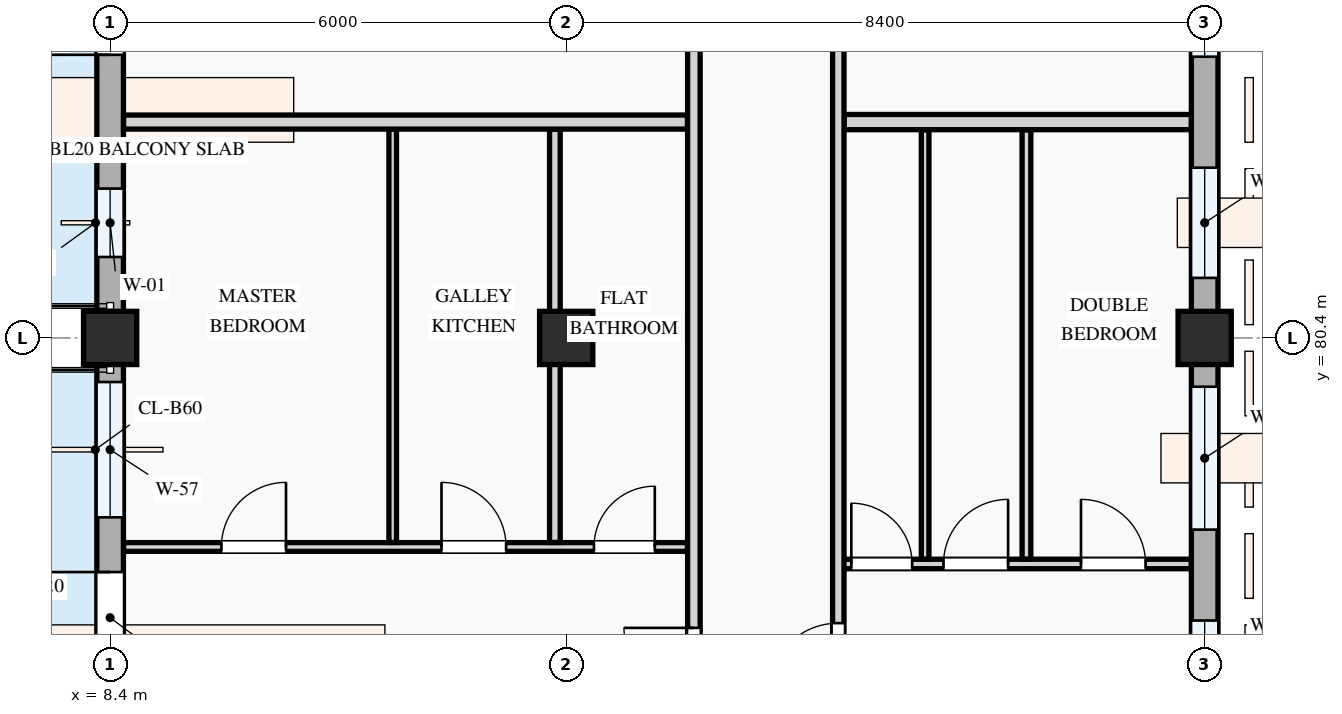
"""IFC4 building model, lengths in metres.
Left out: names, types, materials, properties, quantities, classifications, styles, units other than length and angle.
Written with IfcOpenShell. Run it as: python <this file> out.ifc"""

import sys

from ifc_helpers import new_model, si_unit, direction, frame, frame_2d, origin, origin_2d, place, context, subcontext, project, spatial, rectangle, extrude, element, fill, save


model = new_model("IFC4")
c1 = context("Model", 3, precision=1e-05, world=origin(), true_north=direction((0.0, 1.0)))
c2 = subcontext(c1, "Body", "Model", "MODEL_VIEW")
j1 = project(units=[si_unit("LENGTHUNIT", "METRE"), si_unit("PLANEANGLEUNIT", "RADIAN")], contexts=[c1])
p1 = place(None, origin())
s1 = spatial("IfcSite", under=j1, at=p1, CompositionType="ELEMENT")
p2 = place(p1, origin())
s2 = spatial("IfcBuilding", under=s1, at=p2, CompositionType="ELEMENT")
p3 = place(p2, frame((0.0, 0.0, 14.7)))
s3 = spatial("IfcBuildingStorey", under=s2, at=p3, CompositionType="ELEMENT", Elevation=14.7)
for number, where, z_axis, x_axis in (
    (1, (8.4, 80.4, 0.0), (0.0, 0.0, 1.0), (1.0, 0.0, 0.0)),
    (2, (14.4, 80.4, 0.0), (0.0, 0.0, 1.0), (1.0, 0.0, 0.0)),
    (3, (22.8, 80.4, 0.0), (0.0, 0.0, 1.0), (1.0, 0.0, 0.0)),
):
    element("IfcColumn", number, at=place(p3, frame(where, z_axis=z_axis, x_axis=x_axis)), inside=s3, PredefinedType="COLUMN", context=c2, shape_type="SweptSolid", body=[
        extrude(rectangle(XDim=0.7, YDim=0.7, at=origin_2d()), origin(), (0.0, 0.0, 1.0), 3.3),
    ])
p4 = place(p3, frame((8.4, 86.4, 0.0), z_axis=(0.0, 0.0, 1.0), x_axis=(0.0, -1.0, 0.0)))
e4 = element("IfcWall", 4, at=p4, inside=s3, PredefinedType="STANDARD", context=c2, shape_type="SweptSolid", body=[
    extrude(rectangle(XDim=6.0, YDim=0.35, at=frame_2d((3.0, 0.0))), origin(), (0.0, 0.0, 1.0), 2.445),
])
p5 = place(p4, frame((1.175, 0.0, 0.0)))
e5 = element("IfcOpeningElement", 5, at=p5, cuts=e4, PredefinedType="OPENING", context=c2, shape_type="SweptSolid", body=[
    extrude(rectangle(XDim=1.1, YDim=2.15, at=frame_2d((0.55, 1.075))), frame((0.0, 0.185, 0.0), z_axis=(0.0, -1.0, 0.0), x_axis=(1.0, 0.0, 0.0)), (0.0, 0.0, 1.0), 0.37),
])
p6 = place(p4, frame((4.035, 0.0, 0.78)))
e6 = element("IfcOpeningElement", 6, at=p6, cuts=e4, PredefinedType="OPENING", context=c2, shape_type="SweptSolid", body=[
    extrude(rectangle(XDim=0.9, YDim=1.2, at=frame_2d((0.45, 0.6))), frame((0.0, 0.185, 0.0), z_axis=(0.0, -1.0, 0.0), x_axis=(1.0, 0.0, 0.0)), (0.0, 0.0, 1.0), 0.37),
])
p7 = place(p3, frame((8.4, 80.4, 0.0), z_axis=(0.0, 0.0, 1.0), x_axis=(0.0, -1.0, 0.0)))
e7 = element("IfcWall", 7, at=p7, inside=s3, PredefinedType="STANDARD", context=c2, shape_type="SweptSolid", body=[
    extrude(rectangle(XDim=8.4, YDim=0.35, at=frame_2d((4.2, 0.0))), origin(), (0.0, 0.0, 1.0), 2.345),
])
p8 = place(p7, frame((3.08, 0.0, 0.0)))
e8 = element("IfcOpeningElement", 8, at=p8, cuts=e7, PredefinedType="OPENING", context=c2, shape_type="SweptSolid", body=[
    extrude(rectangle(XDim=1.2, YDim=2.15, at=frame_2d((0.6, 1.075))), frame((0.0, 0.185, 0.0), z_axis=(0.0, -1.0, 0.0), x_axis=(1.0, 0.0, 0.0)), (0.0, 0.0, 1.0), 0.37),
])
p9 = place(p7, frame((0.58, 0.0, 0.78)))
e9 = element("IfcOpeningElement", 9, at=p9, cuts=e7, PredefinedType="OPENING", context=c2, shape_type="SweptSolid", body=[
    extrude(rectangle(XDim=1.78, YDim=1.42, at=frame_2d((0.89, 0.71))), frame((0.0, 0.185, 0.0), z_axis=(0.0, -1.0, 0.0), x_axis=(1.0, 0.0, 0.0)), (0.0, 0.0, 1.0), 0.37),
])
p10 = place(p7, frame((5.51, 0.0, 0.78)))
e10 = element("IfcOpeningElement", 10, at=p10, cuts=e7, PredefinedType="OPENING", context=c2, shape_type="SweptSolid", body=[
    extrude(rectangle(XDim=1.52, YDim=1.42, at=frame_2d((0.76, 0.71))), frame((0.0, 0.185, 0.0), z_axis=(0.0, -1.0, 0.0), x_axis=(1.0, 0.0, 0.0)), (0.0, 0.0, 1.0), 0.37),
])
p11 = place(p3, frame((22.8, 72.0, 0.0), z_axis=(0.0, 0.0, 1.0), x_axis=(0.0, 1.0, 0.0)))
e11 = element("IfcWall", 11, at=p11, inside=s3, PredefinedType="STANDARD", context=c2, shape_type="SweptSolid", body=[
    extrude(rectangle(XDim=8.4, YDim=0.35, at=frame_2d((4.2, 0.0))), origin(), (0.0, 0.0, 1.0), 2.425),
])
p12 = place(p11, frame((0.544, 0.0, 0.78)))
e12 = element("IfcOpeningElement", 12, at=p12, cuts=e11, PredefinedType="OPENING", context=c2, shape_type="SweptSolid", body=[
    extrude(rectangle(XDim=1.98, YDim=1.5, at=frame_2d((0.99, 0.75))), frame((0.0, 0.185, 0.0), z_axis=(0.0, -1.0, 0.0), x_axis=(1.0, 0.0, 0.0)), (0.0, 0.0, 1.0), 0.37),
])
p13 = place(p11, frame((3.482, 0.0, 0.78)))
e13 = element("IfcOpeningElement", 13, at=p13, cuts=e11, PredefinedType="OPENING", context=c2, shape_type="SweptSolid", body=[
    extrude(rectangle(XDim=1.2, YDim=1.35, at=frame_2d((0.6, 0.675))), frame((0.0, 0.185, 0.0), z_axis=(0.0, -1.0, 0.0), x_axis=(1.0, 0.0, 0.0)), (0.0, 0.0, 1.0), 0.37),
])
p14 = place(p11, frame((5.878, 0.0, 0.78)))
e14 = element("IfcOpeningElement", 14, at=p14, cuts=e11, PredefinedType="OPENING", context=c2, shape_type="SweptSolid", body=[
    extrude(rectangle(XDim=1.88, YDim=1.52, at=frame_2d((0.94, 0.76))), frame((0.0, 0.185, 0.0), z_axis=(0.0, -1.0, 0.0), x_axis=(1.0, 0.0, 0.0)), (0.0, 0.0, 1.0), 0.37),
])
p15 = place(p3, frame((22.8, 80.4, 0.0), z_axis=(0.0, 0.0, 1.0), x_axis=(0.0, 1.0, 0.0)))
e15 = element("IfcWall", 15, at=p15, inside=s3, PredefinedType="STANDARD", context=c2, shape_type="SweptSolid", body=[
    extrude(rectangle(XDim=6.0, YDim=0.35, at=frame_2d((3.0, 0.0))), origin(), (0.0, 0.0, 1.0), 2.575),
])
p16 = place(p15, frame((0.79, 0.0, 0.78)))
e16 = element("IfcOpeningElement", 16, at=p16, cuts=e15, PredefinedType="OPENING", context=c2, shape_type="SweptSolid", body=[
    extrude(rectangle(XDim=1.45, YDim=1.6, at=frame_2d((0.725, 0.8))), frame((0.0, 0.185, 0.0), z_axis=(0.0, -1.0, 0.0), x_axis=(1.0, 0.0, 0.0)), (0.0, 0.0, 1.0), 0.37),
])
p17 = place(p15, frame((3.7, 0.0, 0.78)))
e17 = element("IfcOpeningElement", 17, at=p17, cuts=e15, PredefinedType="OPENING", context=c2, shape_type="SweptSolid", body=[
    extrude(rectangle(XDim=1.25, YDim=1.45, at=frame_2d((0.625, 0.725))), frame((0.0, 0.185, 0.0), z_axis=(0.0, -1.0, 0.0), x_axis=(1.0, 0.0, 0.0)), (0.0, 0.0, 1.0), 0.37),
])
p18 = place(p3, frame((8.577, 77.65, 0.0), z_axis=(0.0, 0.0, 1.0), x_axis=(1.0, 0.0, 0.0)))
e18 = element("IfcWall", 18, at=p18, inside=s3, PredefinedType="PARTITIONING", context=c2, shape_type="SweptSolid", body=[
    extrude(rectangle(XDim=7.419, YDim=0.115, at=frame_2d((3.709, 0.0))), origin(), (0.0, 0.0, 1.0), 3.0),
])
p19 = place(p18, frame((1.287, 0.0, 0.0)))
e19 = element("IfcOpeningElement", 19, at=p19, cuts=e18, PredefinedType="OPENING", context=c2, shape_type="SweptSolid", body=[
    extrude(rectangle(XDim=0.85, YDim=2.1, at=frame_2d((0.425, 1.05))), frame((0.0, 0.067, 0.0), z_axis=(0.0, -1.0, 0.0), x_axis=(1.0, 0.0, 0.0)), (0.0, 0.0, 1.0), 0.135),
])
p20 = place(p18, frame((4.182, 0.0, 0.0)))
e20 = element("IfcOpeningElement", 20, at=p20, cuts=e18, PredefinedType="OPENING", context=c2, shape_type="SweptSolid", body=[
    extrude(rectangle(XDim=0.85, YDim=2.1, at=frame_2d((0.425, 1.05))), frame((0.0, 0.067, 0.0), z_axis=(0.0, -1.0, 0.0), x_axis=(1.0, 0.0, 0.0)), (0.0, 0.0, 1.0), 0.135),
])
p21 = place(p18, frame((6.189, 0.0, 0.0)))
e21 = element("IfcOpeningElement", 21, at=p21, cuts=e18, PredefinedType="OPENING", context=c2, shape_type="SweptSolid", body=[
    extrude(rectangle(XDim=0.8, YDim=2.1, at=frame_2d((0.4, 1.05))), frame((0.0, 0.067, 0.0), z_axis=(0.0, -1.0, 0.0), x_axis=(1.0, 0.0, 0.0)), (0.0, 0.0, 1.0), 0.135),
])
p22 = place(p3, frame((12.118, 77.709, 0.0), z_axis=(0.0, 0.0, 1.0), x_axis=(0.0, 1.0, 0.0)))
e22 = element("IfcWall", 22, at=p22, inside=s3, PredefinedType="PARTITIONING", context=c2, shape_type="SweptSolid", body=[
    extrude(rectangle(XDim=5.436, YDim=0.1, at=frame_2d((2.718, 0.0))), origin(), (0.0, 0.0, 1.0), 3.0),
])
p23 = place(p3, frame((14.251, 77.709, 0.0), z_axis=(0.0, 0.0, 1.0), x_axis=(0.0, 1.0, 0.0)))
e23 = element("IfcWall", 23, at=p23, inside=s3, PredefinedType="PARTITIONING", context=c2, shape_type="SweptSolid", body=[
    extrude(rectangle(XDim=5.436, YDim=0.14, at=frame_2d((2.718, 0.0))), origin(), (0.0, 0.0, 1.0), 2.425),
])
p24 = place(p3, frame((17.98, 77.427, 0.0), z_axis=(0.0, 0.0, 1.0), x_axis=(1.0, 0.0, 0.0)))
e24 = element("IfcWall", 24, at=p24, inside=s3, PredefinedType="PARTITIONING", context=c2, shape_type="SweptSolid", body=[
    extrude(rectangle(XDim=4.643, YDim=0.125, at=frame_2d((2.322, 0.0))), origin(), (0.0, 0.0, 1.0), 3.0),
])
p25 = place(p24, frame((0.171, 0.0, 0.0)))
e25 = element("IfcOpeningElement", 25, at=p25, cuts=e24, PredefinedType="OPENING", context=c2, shape_type="SweptSolid", body=[
    extrude(rectangle(XDim=0.8, YDim=2.1, at=frame_2d((0.4, 1.05))), frame((0.0, 0.073, 0.0), z_axis=(0.0, -1.0, 0.0), x_axis=(1.0, 0.0, 0.0)), (0.0, 0.0, 1.0), 0.145),
])
p26 = place(p24, frame((1.384, 0.0, 0.0)))
e26 = element("IfcOpeningElement", 26, at=p26, cuts=e24, PredefinedType="OPENING", context=c2, shape_type="SweptSolid", body=[
    extrude(rectangle(XDim=0.85, YDim=2.1, at=frame_2d((0.425, 1.05))), frame((0.0, 0.073, 0.0), z_axis=(0.0, -1.0, 0.0), x_axis=(1.0, 0.0, 0.0)), (0.0, 0.0, 1.0), 0.145),
])
p27 = place(p24, frame((3.193, 0.0, 0.0)))
e27 = element("IfcOpeningElement", 27, at=p27, cuts=e24, PredefinedType="OPENING", context=c2, shape_type="SweptSolid", body=[
    extrude(rectangle(XDim=0.85, YDim=2.1, at=frame_2d((0.425, 1.05))), frame((0.0, 0.073, 0.0), z_axis=(0.0, -1.0, 0.0), x_axis=(1.0, 0.0, 0.0)), (0.0, 0.0, 1.0), 0.145),
])
p28 = place(p3, frame((20.455, 77.491, 0.0), z_axis=(0.0, 0.0, 1.0), x_axis=(0.0, 1.0, 0.0)))
e28 = element("IfcWall", 28, at=p28, inside=s3, PredefinedType="PARTITIONING", context=c2, shape_type="SweptSolid", body=[
    extrude(rectangle(XDim=5.647, YDim=0.115, at=frame_2d((2.823, 0.0))), origin(), (0.0, 0.0, 1.0), 3.0),
])
p29 = place(p3, frame((19.122, 77.491, 0.0), z_axis=(0.0, 0.0, 1.0), x_axis=(0.0, 1.0, 0.0)))
e29 = element("IfcWall", 29, at=p29, inside=s3, PredefinedType="PARTITIONING", context=c2, shape_type="SweptSolid", body=[
    extrude(rectangle(XDim=5.647, YDim=0.1, at=frame_2d((2.823, 0.0))), origin(), (0.0, 0.0, 1.0), 3.0),
])
p30 = place(p3, frame((8.577, 83.24, 0.0), z_axis=(0.0, 0.0, 1.0), x_axis=(1.0, 0.0, 0.0)))
e30 = element("IfcWall", 30, at=p30, inside=s3, PredefinedType="PARTITIONING", context=c2, shape_type="SweptSolid", body=[
    extrude(rectangle(XDim=7.419, YDim=0.185, at=frame_2d((3.709, 0.0))), origin(), (0.0, 0.0, 1.0), 3.0),
])
p31 = place(p3, frame((18.057, 83.24, 0.0), z_axis=(0.0, 0.0, 1.0), x_axis=(1.0, 0.0, 0.0)))
e31 = element("IfcWall", 31, at=p31, inside=s3, PredefinedType="PARTITIONING", context=c2, shape_type="SweptSolid", body=[
    extrude(rectangle(XDim=4.566, YDim=0.2, at=frame_2d((2.283, 0.0))), origin(), (0.0, 0.0, 1.0), 3.0),
])
p32 = place(p3, frame((16.08, 72.177, 0.0), z_axis=(0.0, 0.0, 1.0), x_axis=(0.0, 1.0, 0.0)))
e32 = element("IfcWall", 32, at=p32, inside=s3, PredefinedType="PARTITIONING", context=c2, shape_type="SweptSolid", body=[
    extrude(rectangle(XDim=37.163, YDim=0.165, at=frame_2d((18.582, 0.0))), origin(), (0.0, 0.0, 1.0), 3.0),
])
p33 = place(p32, frame((3.489, 0.0, 0.0)))
e33 = element("IfcOpeningElement", 33, at=p33, cuts=e32, PredefinedType="OPENING", context=c2, shape_type="SweptSolid", body=[
    extrude(rectangle(XDim=0.92, YDim=2.1, at=frame_2d((0.46, 1.05))), frame((0.0, 0.093, 0.0), z_axis=(0.0, -1.0, 0.0), x_axis=(1.0, 0.0, 0.0)), (0.0, 0.0, 1.0), 0.185),
])
p34 = place(p32, frame((16.543, 0.0, 0.0)))
e34 = element("IfcOpeningElement", 34, at=p34, cuts=e32, PredefinedType="OPENING", context=c2, shape_type="SweptSolid", body=[
    extrude(rectangle(XDim=0.92, YDim=2.1, at=frame_2d((0.46, 1.05))), frame((0.0, 0.093, 0.0), z_axis=(0.0, -1.0, 0.0), x_axis=(1.0, 0.0, 0.0)), (0.0, 0.0, 1.0), 0.185),
])
p35 = place(p32, frame((25.152, 0.0, 0.0)))
e35 = element("IfcOpeningElement", 35, at=p35, cuts=e32, PredefinedType="OPENING", context=c2, shape_type="SweptSolid", body=[
    extrude(rectangle(XDim=0.92, YDim=2.1, at=frame_2d((0.46, 1.05))), frame((0.0, 0.093, 0.0), z_axis=(0.0, -1.0, 0.0), x_axis=(1.0, 0.0, 0.0)), (0.0, 0.0, 1.0), 0.185),
])
p36 = place(p3, frame((17.98, 72.177, 0.0), z_axis=(0.0, 0.0, 1.0), x_axis=(0.0, 1.0, 0.0)))
e36 = element("IfcWall", 36, at=p36, inside=s3, PredefinedType="PARTITIONING", context=c2, shape_type="SweptSolid", body=[
    extrude(rectangle(XDim=37.163, YDim=0.15, at=frame_2d((18.582, 0.0))), origin(), (0.0, 0.0, 1.0), 3.0),
])
p37 = place(p36, frame((3.551, 0.0, 0.0)))
e37 = element("IfcOpeningElement", 37, at=p37, cuts=e36, PredefinedType="OPENING", context=c2, shape_type="SweptSolid", body=[
    extrude(rectangle(XDim=0.92, YDim=2.1, at=frame_2d((0.46, 1.05))), frame((0.0, 0.085, 0.0), z_axis=(0.0, -1.0, 0.0), x_axis=(1.0, 0.0, 0.0)), (0.0, 0.0, 1.0), 0.17),
])
p38 = place(p36, frame((16.275, 0.0, 0.0)))
e38 = element("IfcOpeningElement", 38, at=p38, cuts=e36, PredefinedType="OPENING", context=c2, shape_type="SweptSolid", body=[
    extrude(rectangle(XDim=0.96, YDim=2.12, at=frame_2d((0.48, 1.06))), frame((0.0, 0.085, 0.0), z_axis=(0.0, -1.0, 0.0), x_axis=(1.0, 0.0, 0.0)), (0.0, 0.0, 1.0), 0.17),
])
p39 = place(p36, frame((25.128, 0.0, 0.0)))
e39 = element("IfcOpeningElement", 39, at=p39, cuts=e36, PredefinedType="OPENING", context=c2, shape_type="SweptSolid", body=[
    extrude(rectangle(XDim=0.92, YDim=2.1, at=frame_2d((0.46, 1.05))), frame((0.0, 0.085, 0.0), z_axis=(0.0, -1.0, 0.0), x_axis=(1.0, 0.0, 0.0)), (0.0, 0.0, 1.0), 0.17),
])
p40 = place(p5, frame((1.1, 0.0, 0.0), z_axis=(0.0, 0.0, 1.0), x_axis=(-1.0, 0.0, 0.0)))
e40 = element("IfcDoor", 40, at=p40, inside=s3, OperationType="SINGLE_SWING_LEFT", PredefinedType="DOOR", context=c2, shape_type="SweptSolid", body=[
    extrude(rectangle(XDim=1.1, YDim=2.15, at=frame_2d((0.55, 1.075))), frame((0.0, 0.025, 0.0), z_axis=(0.0, -1.0, 0.0), x_axis=(1.0, 0.0, 0.0)), (0.0, 0.0, 1.0), 0.05),
])
fill(e5, e40)
p41 = place(p6, origin())
e41 = element("IfcWindow", 41, at=p41, inside=s3, PartitioningType="SINGLE_PANEL", PredefinedType="WINDOW", context=c2, shape_type="SweptSolid", body=[
    extrude(rectangle(XDim=0.9, YDim=1.2, at=frame_2d((0.45, 0.6))), frame((0.0, 0.03, 0.0), z_axis=(0.0, -1.0, 0.0), x_axis=(1.0, 0.0, 0.0)), (0.0, 0.0, 1.0), 0.06),
])
fill(e6, e41)
p42 = place(p8, frame((1.2, 0.0, 0.0), z_axis=(0.0, 0.0, 1.0), x_axis=(-1.0, 0.0, 0.0)))
e42 = element("IfcDoor", 42, at=p42, inside=s3, OperationType="SINGLE_SWING_RIGHT", PredefinedType="DOOR", context=c2, shape_type="SweptSolid", body=[
    extrude(rectangle(XDim=1.2, YDim=2.15, at=frame_2d((0.6, 1.075))), frame((0.0, 0.025, 0.0), z_axis=(0.0, -1.0, 0.0), x_axis=(1.0, 0.0, 0.0)), (0.0, 0.0, 1.0), 0.05),
])
fill(e8, e42)
p43 = place(p9, origin())
e43 = element("IfcWindow", 43, at=p43, inside=s3, PartitioningType="DOUBLE_PANEL_VERTICAL", PredefinedType="WINDOW", context=c2, shape_type="SweptSolid", body=[
    extrude(rectangle(XDim=1.78, YDim=1.42, at=frame_2d((0.89, 0.71))), frame((0.0, 0.03, 0.0), z_axis=(0.0, -1.0, 0.0), x_axis=(1.0, 0.0, 0.0)), (0.0, 0.0, 1.0), 0.06),
])
fill(e9, e43)
p44 = place(p13, origin())
e44 = element("IfcWindow", 44, at=p44, inside=s3, PartitioningType="SINGLE_PANEL", PredefinedType="WINDOW", context=c2, shape_type="SweptSolid", body=[
    extrude(rectangle(XDim=1.2, YDim=1.35, at=frame_2d((0.6, 0.675))), frame((0.0, 0.03, 0.0), z_axis=(0.0, -1.0, 0.0), x_axis=(1.0, 0.0, 0.0)), (0.0, 0.0, 1.0), 0.06),
])
fill(e13, e44)
p45 = place(p14, origin())
e45 = element("IfcWindow", 45, at=p45, inside=s3, PartitioningType="DOUBLE_PANEL_VERTICAL", PredefinedType="WINDOW", context=c2, shape_type="SweptSolid", body=[
    extrude(rectangle(XDim=1.88, YDim=1.52, at=frame_2d((0.94, 0.76))), frame((0.0, 0.03, 0.0), z_axis=(0.0, -1.0, 0.0), x_axis=(1.0, 0.0, 0.0)), (0.0, 0.0, 1.0), 0.06),
])
fill(e14, e45)
p46 = place(p16, origin())
e46 = element("IfcWindow", 46, at=p46, inside=s3, PartitioningType="SINGLE_PANEL", PredefinedType="WINDOW", context=c2, shape_type="SweptSolid", body=[
    extrude(rectangle(XDim=1.45, YDim=1.6, at=frame_2d((0.725, 0.8))), frame((0.0, 0.03, 0.0), z_axis=(0.0, -1.0, 0.0), x_axis=(1.0, 0.0, 0.0)), (0.0, 0.0, 1.0), 0.06),
])
fill(e16, e46)
p47 = place(p17, origin())
e47 = element("IfcWindow", 47, at=p47, inside=s3, PartitioningType="SINGLE_PANEL", PredefinedType="WINDOW", context=c2, shape_type="SweptSolid", body=[
    extrude(rectangle(XDim=1.25, YDim=1.45, at=frame_2d((0.625, 0.725))), frame((0.0, 0.03, 0.0), z_axis=(0.0, -1.0, 0.0), x_axis=(1.0, 0.0, 0.0)), (0.0, 0.0, 1.0), 0.06),
])
fill(e17, e47)
p48 = place(p19, origin())
e48 = element("IfcDoor", 48, at=p48, inside=s3, OperationType="SINGLE_SWING_RIGHT", PredefinedType="DOOR", context=c2, shape_type="SweptSolid", body=[
    extrude(rectangle(XDim=0.85, YDim=2.1, at=frame_2d((0.425, 1.05))), frame((0.0, 0.025, 0.0), z_axis=(0.0, -1.0, 0.0), x_axis=(1.0, 0.0, 0.0)), (0.0, 0.0, 1.0), 0.05),
])
fill(e19, e48)
p49 = place(p20, origin())
e49 = element("IfcDoor", 49, at=p49, inside=s3, OperationType="SINGLE_SWING_LEFT", PredefinedType="DOOR", context=c2, shape_type="SweptSolid", body=[
    extrude(rectangle(XDim=0.85, YDim=2.1, at=frame_2d((0.425, 1.05))), frame((0.0, 0.025, 0.0), z_axis=(0.0, -1.0, 0.0), x_axis=(1.0, 0.0, 0.0)), (0.0, 0.0, 1.0), 0.05),
])
fill(e20, e49)
p50 = place(p21, origin())
e50 = element("IfcDoor", 50, at=p50, inside=s3, OperationType="SINGLE_SWING_RIGHT", PredefinedType="DOOR", context=c2, shape_type="SweptSolid", body=[
    extrude(rectangle(XDim=0.8, YDim=2.1, at=frame_2d((0.4, 1.05))), frame((0.0, 0.025, 0.0), z_axis=(0.0, -1.0, 0.0), x_axis=(1.0, 0.0, 0.0)), (0.0, 0.0, 1.0), 0.05),
])
fill(e21, e50)
p51 = place(p25, origin())
e51 = element("IfcDoor", 51, at=p51, inside=s3, OperationType="SINGLE_SWING_LEFT", PredefinedType="DOOR", context=c2, shape_type="SweptSolid", body=[
    extrude(rectangle(XDim=0.8, YDim=2.1, at=frame_2d((0.4, 1.05))), frame((0.0, 0.025, 0.0), z_axis=(0.0, -1.0, 0.0), x_axis=(1.0, 0.0, 0.0)), (0.0, 0.0, 1.0), 0.05),
])
fill(e25, e51)
p52 = place(p26, origin())
e52 = element("IfcDoor", 52, at=p52, inside=s3, OperationType="SINGLE_SWING_RIGHT", PredefinedType="DOOR", context=c2, shape_type="SweptSolid", body=[
    extrude(rectangle(XDim=0.85, YDim=2.1, at=frame_2d((0.425, 1.05))), frame((0.0, 0.025, 0.0), z_axis=(0.0, -1.0, 0.0), x_axis=(1.0, 0.0, 0.0)), (0.0, 0.0, 1.0), 0.05),
])
fill(e26, e52)
p53 = place(p27, origin())
e53 = element("IfcDoor", 53, at=p53, inside=s3, OperationType="SINGLE_SWING_LEFT", PredefinedType="DOOR", context=c2, shape_type="SweptSolid", body=[
    extrude(rectangle(XDim=0.85, YDim=2.1, at=frame_2d((0.425, 1.05))), frame((0.0, 0.025, 0.0), z_axis=(0.0, -1.0, 0.0), x_axis=(1.0, 0.0, 0.0)), (0.0, 0.0, 1.0), 0.05),
])
fill(e27, e53)
p54 = place(p33, origin())
e54 = element("IfcDoor", 54, at=p54, inside=s3, OperationType="SINGLE_SWING_RIGHT", PredefinedType="DOOR", context=c2, shape_type="SweptSolid", body=[
    extrude(rectangle(XDim=0.92, YDim=2.1, at=frame_2d((0.46, 1.05))), frame((0.0, 0.025, 0.0), z_axis=(0.0, -1.0, 0.0), x_axis=(1.0, 0.0, 0.0)), (0.0, 0.0, 1.0), 0.05),
])
fill(e33, e54)
p55 = place(p37, origin())
e55 = element("IfcDoor", 55, at=p55, inside=s3, OperationType="SINGLE_SWING_LEFT", PredefinedType="DOOR", context=c2, shape_type="SweptSolid", body=[
    extrude(rectangle(XDim=0.92, YDim=2.1, at=frame_2d((0.46, 1.05))), frame((0.0, 0.025, 0.0), z_axis=(0.0, -1.0, 0.0), x_axis=(1.0, 0.0, 0.0)), (0.0, 0.0, 1.0), 0.05),
])
fill(e37, e55)
save(model, sys.argv[1])
